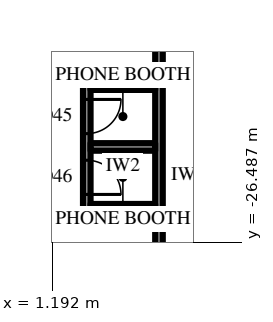
"""IFC4 building model, lengths in metres.
Left out: names, types, materials, properties, quantities, classifications, styles, units other than length and angle.
Written with IfcOpenShell. Run it as: python <this file> out.ifc"""

import sys

from ifc_helpers import new_model, si_unit, direction, frame, frame_2d, origin, place, context, subcontext, project, spatial, rectangle, extrude, element, fill, save


model = new_model("IFC4")
c1 = context("Model", 3, precision=1e-05, world=origin(), true_north=direction((0.0, 1.0)))
c2 = subcontext(c1, "Body", "Model", "MODEL_VIEW")
j1 = project(units=[si_unit("LENGTHUNIT", "METRE"), si_unit("PLANEANGLEUNIT", "RADIAN")], contexts=[c1])
p1 = place(None, origin())
s1 = spatial("IfcSite", under=j1, at=p1, CompositionType="ELEMENT")
p2 = place(p1, origin())
s2 = spatial("IfcBuilding", under=s1, at=p2, CompositionType="ELEMENT")
p3 = place(p2, frame((0.0, 0.0, 65.5)))
s3 = spatial("IfcBuildingStorey", under=s2, at=p3, CompositionType="ELEMENT", Elevation=65.5)
p4 = place(p3, frame((4.0, -18.7, 0.0), z_axis=(0.0, 0.0, 1.0), x_axis=(0.0, -1.0, 0.0)))
e1 = element("IfcWall", 1, at=p4, inside=s3, PredefinedType="PARTITIONING", context=c2, shape_type="SweptSolid", body=[
    extrude(rectangle(XDim=15.1, YDim=0.2, at=frame_2d((7.55, 0.0))), origin(), (0.0, 0.0, 1.0), 4.0),
])
p5 = place(p4, frame((1.01, 0.0, 0.0)))
e2 = element("IfcOpeningElement", 2, at=p5, cuts=e1, PredefinedType="OPENING", context=c2, shape_type="SweptSolid", body=[
    extrude(rectangle(XDim=1.0, YDim=2.2, at=frame_2d((0.5, 1.1))), frame((0.0, 0.11, 0.0), z_axis=(0.0, -1.0, 0.0), x_axis=(1.0, 0.0, 0.0)), (0.0, 0.0, 1.0), 0.22),
])
p6 = place(p3, frame((2.1, -22.285, 0.0), z_axis=(0.0, 0.0, 1.0), x_axis=(0.0, -1.0, 0.0)))
e3 = element("IfcWall", 3, at=p6, inside=s3, PredefinedType="PARTITIONING", context=c2, shape_type="SweptSolid", body=[
    extrude(rectangle(XDim=3.4, YDim=0.2, at=frame_2d((1.7, 0.0))), origin(), (0.0, 0.0, 1.0), 4.0),
])
p7 = place(p6, frame((0.45, 0.0, 0.0)))
e4 = element("IfcOpeningElement", 4, at=p7, cuts=e3, PredefinedType="OPENING", context=c2, shape_type="SweptSolid", body=[
    extrude(rectangle(XDim=0.9, YDim=2.2, at=frame_2d((0.45, 1.1))), frame((0.0, 0.11, 0.0), z_axis=(0.0, -1.0, 0.0), x_axis=(1.0, 0.0, 0.0)), (0.0, 0.0, 1.0), 0.22),
])
p8 = place(p6, frame((2.05, 0.0, 0.0)))
e5 = element("IfcOpeningElement", 5, at=p8, cuts=e3, PredefinedType="OPENING", context=c2, shape_type="SweptSolid", body=[
    extrude(rectangle(XDim=0.9, YDim=2.2, at=frame_2d((0.45, 1.1))), frame((0.0, 0.11, 0.0), z_axis=(0.0, -1.0, 0.0), x_axis=(1.0, 0.0, 0.0)), (0.0, 0.0, 1.0), 0.22),
])
for number, where, z_axis, x_axis in (
    (6, (3.9, -22.385, 0.0), (0.0, 0.0, 1.0), (-1.0, 0.0, 0.0)),
    (7, (3.9, -23.985, 0.0), (0.0, 0.0, 1.0), (-1.0, 0.0, 0.0)),
    (8, (3.9, -25.585, 0.0), (0.0, 0.0, 1.0), (-1.0, 0.0, 0.0)),
):
    element("IfcWall", number, at=place(p3, frame(where, z_axis=z_axis, x_axis=x_axis)), inside=s3, PredefinedType="PARTITIONING", context=c2, shape_type="SweptSolid", body=[
        extrude(rectangle(XDim=1.7, YDim=0.2, at=frame_2d((0.85, 0.0))), origin(), (0.0, 0.0, 1.0), 4.0),
    ])
p9 = place(p7, origin())
e9 = element("IfcDoor", 9, at=p9, inside=s3, OperationType="SINGLE_SWING_RIGHT", PredefinedType="DOOR", context=c2, shape_type="SweptSolid", body=[
    extrude(rectangle(XDim=0.9, YDim=2.2, at=frame_2d((0.45, 1.1))), frame((0.0, 0.025, 0.0), z_axis=(0.0, -1.0, 0.0), x_axis=(1.0, 0.0, 0.0)), (0.0, 0.0, 1.0), 0.05),
])
fill(e4, e9)
p10 = place(p8, origin())
e10 = element("IfcDoor", 10, at=p10, inside=s3, OperationType="SINGLE_SWING_LEFT", PredefinedType="DOOR", context=c2, shape_type="SweptSolid", body=[
    extrude(rectangle(XDim=0.9, YDim=2.2, at=frame_2d((0.45, 1.1))), frame((0.0, 0.025, 0.0), z_axis=(0.0, -1.0, 0.0), x_axis=(1.0, 0.0, 0.0)), (0.0, 0.0, 1.0), 0.05),
])
fill(e5, e10)
save(model, sys.argv[1])
